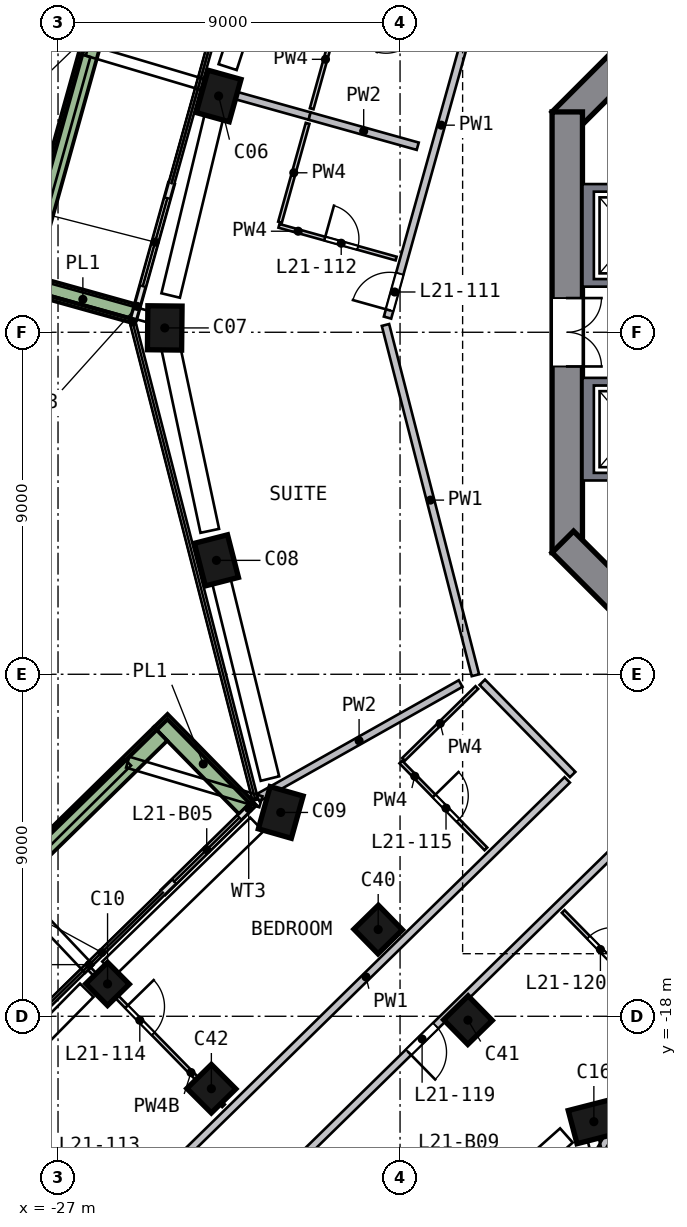
"""IFC4 building model, lengths in metres.
Left out: names, types, materials, properties, quantities, classifications, styles, units other than length and angle.
Written with IfcOpenShell. Run it as: python <this file> out.ifc"""

import sys

from ifc_helpers import new_model, si_unit, direction, frame, frame_2d, origin, origin_2d, place, context, subcontext, project, spatial, polyline, rectangle, outline, extrude, element, fill, save


model = new_model("IFC4")
c1 = context("Model", 3, precision=1e-05, world=origin(), true_north=direction((0.0, 1.0)))
c2 = subcontext(c1, "Body", "Model", "MODEL_VIEW")
j1 = project(units=[si_unit("LENGTHUNIT", "METRE"), si_unit("PLANEANGLEUNIT", "RADIAN")], contexts=[c1])
p1 = place(None, origin())
s1 = spatial("IfcSite", under=j1, at=p1, CompositionType="ELEMENT")
p2 = place(p1, origin())
s2 = spatial("IfcBuilding", under=s1, at=p2, CompositionType="ELEMENT")
p3 = place(p2, frame((0.0, 0.0, 93.0)))
s3 = spatial("IfcBuildingStorey", under=s2, at=p3, CompositionType="ELEMENT", Elevation=93.0)
p4 = place(p3, frame((-22.739, 6.349, 0.0), z_axis=(-0.029279539, -0.108372319, 0.993679098), x_axis=(-0.267305592, -0.957051078, -0.112253975)))
e1 = element("IfcColumn", 1, at=p4, inside=s3, PredefinedType="COLUMN", context=c2, shape_type="SweptSolid", body=[
    extrude(rectangle(XDim=1.15, YDim=0.9, at=origin_2d()), origin(), (0.0, 0.0, 1.0), 3.21),
])
p5 = place(p3, frame((-24.191, 0.253, 0.0), z_axis=(-0.000228077, -0.11510311, 0.993353523), x_axis=(0.010401576, 0.993299538, 0.115099243)))
e2 = element("IfcColumn", 2, at=p5, inside=s3, PredefinedType="COLUMN", context=c2, shape_type="SweptSolid", body=[
    extrude(rectangle(XDim=1.15, YDim=0.9, at=origin_2d()), origin(), (0.0, 0.0, 1.0), 3.211),
])
p6 = place(p3, frame((-22.867, -5.871, 0.0), z_axis=(0.028823141, -0.108524069, 0.993675879), x_axis=(0.246911463, -0.962510976, -0.112282459)))
e3 = element("IfcColumn", 3, at=p6, inside=s3, PredefinedType="COLUMN", context=c2, shape_type="SweptSolid", body=[
    extrude(rectangle(XDim=1.15, YDim=0.9, at=origin_2d()), origin(), (0.0, 0.0, 1.0), 3.21),
])
p7 = place(p3, frame((-21.212, -12.515, 0.0), z_axis=(0.060350449, -0.100330722, 0.993122132), x_axis=(0.274530896, 0.958234332, 0.080123357)))
e4 = element("IfcColumn", 4, at=p7, inside=s3, PredefinedType="COLUMN", context=c2, shape_type="SweptSolid", body=[
    extrude(rectangle(XDim=1.15, YDim=0.9, at=origin_2d()), origin(), (0.0, 0.0, 1.0), 3.212),
])
p8 = place(p3, frame((-25.863, -17.069, 0.0), z_axis=(0.13669492, -0.066040213, 0.988409424), x_axis=(-0.708286762, -0.704086575, 0.050911266)))
e5 = element("IfcColumn", 5, at=p8, inside=s3, PredefinedType="COLUMN", context=c2, shape_type="SweptSolid", body=[
    extrude(rectangle(XDim=0.8, YDim=0.8, at=origin_2d()), origin(), (0.0, 0.0, 1.0), 3.227),
])
p9 = place(p3, frame((-13.02, -20.7, 0.0), z_axis=(0.098896689, -0.061040769, 0.993223776), x_axis=(-0.963723758, -0.254530475, 0.080316596)))
e6 = element("IfcColumn", 6, at=p9, inside=s3, PredefinedType="COLUMN", context=c2, shape_type="SweptSolid", body=[
    extrude(rectangle(XDim=1.15, YDim=0.9, at=origin_2d()), origin(), (0.0, 0.0, 1.0), 3.212),
])
for number, where, z_axis, x_axis in (
    (7, (-18.666, -15.611, 0.0), (0.075, -0.088, 0.993), (-0.715, -0.699, -0.008)),
    (8, (-16.317, -18.009, 0.0), (0.086, -0.077, 0.993), (-0.714, -0.7, 0.008)),
):
    element("IfcColumn", number, at=place(p3, frame(where, z_axis=z_axis, x_axis=x_axis)), inside=s3, PredefinedType="COLUMN", context=c2, shape_type="SweptSolid", body=[
        extrude(rectangle(XDim=0.9, YDim=0.9, at=origin_2d()), origin(), (0.0, 0.0, 1.0), 3.211),
    ])
p10 = place(p3, frame((-23.147, -19.842, 0.0), z_axis=(0.149542975, -0.053046573, 0.987331231), x_axis=(-0.705762773, -0.705078684, 0.069014181)))
e9 = element("IfcColumn", 9, at=p10, inside=s3, PredefinedType="COLUMN", context=c2, shape_type="SweptSolid", body=[
    extrude(rectangle(XDim=0.9, YDim=0.9, at=origin_2d()), origin(), (0.0, 0.0, 1.0), 3.231),
])
p11 = place(p3, frame((-5.516, 13.717, 0.0), z_axis=(0.0, 0.0, 1.0), x_axis=(-0.707106781, -0.707106781, 0.0)))
e10 = element("IfcWall", 10, at=p11, inside=s3, PredefinedType="SHEAR", context=c2, shape_type="SweptSolid", body=[
    extrude(rectangle(XDim=11.598, YDim=0.8, at=frame_2d((5.799, 0.0))), origin(), (0.0, 0.0, 1.0), 3.5),
])
p12 = place(p3, frame((-13.6, 5.799, 0.0), z_axis=(0.0, 0.0, 1.0), x_axis=(0.0, -1.0, 0.0)))
e11 = element("IfcWall", 11, at=p12, inside=s3, PredefinedType="SHEAR", context=c2, shape_type="SweptSolid", body=[
    extrude(rectangle(XDim=11.598, YDim=0.8, at=frame_2d((5.799, 0.0))), origin(), (0.0, 0.0, 1.0), 3.5),
])
p13 = place(p12, frame((4.899, 0.0, 0.0)))
e12 = element("IfcOpeningElement", 12, at=p13, cuts=e11, PredefinedType="OPENING", context=c2, shape_type="SweptSolid", body=[
    extrude(rectangle(XDim=1.8, YDim=2.1, at=frame_2d((0.9, 1.05))), frame((0.0, 0.41, 0.0), z_axis=(0.0, -1.0, 0.0), x_axis=(1.0, 0.0, 0.0)), (0.0, 0.0, 1.0), 0.82),
])
p14 = place(p3, frame((-13.717, -5.516, 0.0), z_axis=(0.0, 0.0, 1.0), x_axis=(0.707106781, -0.707106781, 0.0)))
e13 = element("IfcWall", 13, at=p14, inside=s3, PredefinedType="SHEAR", context=c2, shape_type="SweptSolid", body=[
    extrude(rectangle(XDim=11.598, YDim=0.8, at=frame_2d((5.799, 0.0))), origin(), (0.0, 0.0, 1.0), 3.5),
])
p15 = place(p14, frame((2.099, 0.0, 0.0)))
e14 = element("IfcOpeningElement", 14, at=p15, cuts=e13, PredefinedType="OPENING", context=c2, shape_type="SweptSolid", body=[
    extrude(rectangle(XDim=1.2, YDim=2.1, at=frame_2d((0.6, 1.05))), frame((0.0, 0.41, 0.0), z_axis=(0.0, -1.0, 0.0), x_axis=(1.0, 0.0, 0.0)), (0.0, 0.0, 1.0), 0.82),
])
p16 = place(p3, frame((-24.016, 3.913, 0.0), z_axis=(0.0, 0.0, 1.0), x_axis=(-0.268875634, -0.963174903, 0.0)))
e15 = element("IfcWall", 15, at=p16, inside=s3, PredefinedType="SOLIDWALL", context=c2, shape_type="SweptSolid", body=[
    extrude(rectangle(XDim=3.71, YDim=0.15, at=frame_2d((1.855, 0.0))), origin(), (0.0, 0.0, 1.0), 2.425),
])
p17 = place(p16, frame((0.4, 0.0, 0.0)))
e16 = element("IfcOpeningElement", 16, at=p17, cuts=e15, PredefinedType="OPENING", context=c2, shape_type="SweptSolid", body=[
    extrude(rectangle(XDim=2.4, YDim=2.4, at=frame_2d((1.2, 1.2))), frame((0.0, 0.085, 0.0), z_axis=(0.0, -1.0, 0.0), x_axis=(1.0, 0.0, 0.0)), (0.0, 0.0, 1.0), 0.17),
])
p18 = place(p3, frame((-21.877, -12.431, 0.0), z_axis=(0.0, 0.0, 1.0), x_axis=(-0.71448032, -0.699655539, 0.0)))
e17 = element("IfcWall", 17, at=p18, inside=s3, PredefinedType="SOLIDWALL", context=c2, shape_type="SweptSolid", body=[
    extrude(rectangle(XDim=3.294, YDim=0.15, at=frame_2d((1.647, 0.0))), origin(), (0.0, 0.0, 1.0), 2.425),
])
p19 = place(p18, frame((0.494, 0.0, 0.0)))
e18 = element("IfcOpeningElement", 18, at=p19, cuts=e17, PredefinedType="OPENING", context=c2, shape_type="SweptSolid", body=[
    extrude(rectangle(XDim=2.4, YDim=2.4, at=frame_2d((1.2, 1.2))), frame((0.0, 0.085, 0.0), z_axis=(0.0, -1.0, 0.0), x_axis=(1.0, 0.0, 0.0)), (0.0, 0.0, 1.0), 0.17),
])
p20 = place(p3, frame((-24.263, 14.274, 0.0), z_axis=(0.0, 0.0, 1.0), x_axis=(-0.26893369, -0.963158694, 0.0)))
e19 = element("IfcWall", 19, at=p20, inside=s3, PredefinedType="SOLIDWALL", context=c2, shape_type="SweptSolid", body=[
    extrude(rectangle(XDim=13.723, YDim=0.5, at=frame_2d((6.862, 0.0))), origin(), (0.0, 0.0, 1.0), 0.7),
])
p21 = place(p3, frame((-27.646, 1.23, 0.0), z_axis=(0.0, 0.0, 1.0), x_axis=(0.963161982, -0.268921917, 0.0)))
e20 = element("IfcWall", 20, at=p21, inside=s3, PredefinedType="SOLIDWALL", context=c2, shape_type="SweptSolid", body=[
    extrude(rectangle(XDim=2.699, YDim=0.5, at=frame_2d((1.35, 0.0))), origin(), (0.0, 0.0, 1.0), 0.7),
])
p22 = place(p3, frame((-22.059, -12.503, 0.0), z_axis=(0.0, 0.0, 1.0), x_axis=(-0.699703527, 0.714433324, 0.0)))
e21 = element("IfcWall", 21, at=p22, inside=s3, PredefinedType="SOLIDWALL", context=c2, shape_type="SweptSolid", body=[
    extrude(rectangle(XDim=3.199, YDim=0.5, at=frame_2d((1.6, 0.0))), origin(), (0.0, 0.0, 1.0), 0.7),
])
p23 = place(p3, frame((-24.301, -10.571, 0.0), z_axis=(0.0, 0.0, 1.0), x_axis=(-0.714470428, -0.69966564, 0.0)))
e22 = element("IfcWall", 22, at=p23, inside=s3, PredefinedType="SOLIDWALL", context=c2, shape_type="SweptSolid", body=[
    extrude(rectangle(XDim=11.824, YDim=0.5, at=frame_2d((5.912, 0.0))), origin(), (0.0, 0.0, 1.0), 0.7),
])
p24 = place(p3, origin())
e23 = element("IfcWall", 23, at=p24, inside=s3, PredefinedType="SOLIDWALL", context=c2, shape_type="SweptSolid", body=[
    extrude(outline(polyline([(-13.2, 3.9), (-10.9, 3.9), (-10.9, 3.7), (-12.9, 3.7), (-12.9, 1.4), (-10.9, 1.4), (-10.9, 1.2), (-13.2, 1.2), (-13.2, 3.9)])), origin(), (0.0, 0.0, 1.0), 3.19),
])
p25 = place(p3, origin())
e24 = element("IfcWall", 24, at=p25, inside=s3, PredefinedType="SOLIDWALL", context=c2, shape_type="SweptSolid", body=[
    extrude(outline(polyline([(-13.2, -3.9), (-13.2, -1.2), (-10.9, -1.2), (-10.9, -1.4), (-12.9, -1.4), (-12.9, -3.7), (-10.9, -3.7), (-10.9, -3.9), (-13.2, -3.9)])), origin(), (0.0, 0.0, 1.0), 3.19),
])
p26 = place(p3, frame((-26.907, -24.809, 0.0), z_axis=(0.0, 0.0, 1.0), x_axis=(0.714474521, 0.699661461, 0.0)))
e25 = element("IfcWall", 25, at=p26, inside=s3, PredefinedType="SOLIDWALL", context=c2, shape_type="SweptSolid", body=[
    extrude(rectangle(XDim=18.624, YDim=0.2, at=frame_2d((9.312, 0.0))), origin(), (0.0, 0.0, 1.0), 3.19),
])
p27 = place(p26, frame((2.6, 0.0, 0.0)))
e26 = element("IfcOpeningElement", 26, at=p27, cuts=e25, PredefinedType="OPENING", context=c2, shape_type="SweptSolid", body=[
    extrude(rectangle(XDim=1.0, YDim=2.1, at=frame_2d((0.5, 1.05))), frame((0.0, 0.11, 0.0), z_axis=(0.0, -1.0, 0.0), x_axis=(1.0, 0.0, 0.0)), (0.0, 0.0, 1.0), 0.22),
])
p28 = place(p3, frame((-12.061, -13.351, 0.0), z_axis=(0.0, 0.0, 1.0), x_axis=(-0.714474521, -0.699661461, 0.0)))
e27 = element("IfcWall", 27, at=p28, inside=s3, PredefinedType="SOLIDWALL", context=c2, shape_type="SweptSolid", body=[
    extrude(rectangle(XDim=18.624, YDim=0.2, at=frame_2d((9.312, 0.0))), origin(), (0.0, 0.0, 1.0), 3.19),
])
p29 = place(p28, frame((7.0, 0.0, 0.0)))
e28 = element("IfcOpeningElement", 28, at=p29, cuts=e27, PredefinedType="OPENING", context=c2, shape_type="SweptSolid", body=[
    extrude(rectangle(XDim=1.0, YDim=2.1, at=frame_2d((0.5, 1.05))), frame((0.0, 0.11, 0.0), z_axis=(0.0, -1.0, 0.0), x_axis=(1.0, 0.0, 0.0)), (0.0, 0.0, 1.0), 0.22),
])
p30 = place(p3, frame((-18.384, 0.192, 0.0), z_axis=(0.0, 0.0, 1.0), x_axis=(0.248682116, -0.968585156, 0.0)))
e29 = element("IfcWall", 29, at=p30, inside=s3, PredefinedType="SOLIDWALL", context=c2, shape_type="SweptSolid", body=[
    extrude(rectangle(XDim=9.516, YDim=0.2, at=frame_2d((4.758, 0.0))), origin(), (0.0, 0.0, 1.0), 3.19),
])
p31 = place(p3, frame((-18.33, 0.386, 0.0), z_axis=(0.0, 0.0, 1.0), x_axis=(0.268911641, 0.96316485, 0.0)))
e30 = element("IfcWall", 30, at=p31, inside=s3, PredefinedType="SOLIDWALL", context=c2, shape_type="SweptSolid", body=[
    extrude(rectangle(XDim=9.116, YDim=0.2, at=frame_2d((4.558, 0.0))), origin(), (0.0, 0.0, 1.0), 3.19),
])
p32 = place(p31, frame((0.2, 0.0, 0.0)))
e31 = element("IfcOpeningElement", 31, at=p32, cuts=e30, PredefinedType="OPENING", context=c2, shape_type="SweptSolid", body=[
    extrude(rectangle(XDim=1.0, YDim=2.1, at=frame_2d((0.5, 1.05))), frame((0.0, 0.11, 0.0), z_axis=(0.0, -1.0, 0.0), x_axis=(1.0, 0.0, 0.0)), (0.0, 0.0, 1.0), 0.22),
])
p33 = place(p3, frame((-15.836, -9.21, 0.0), z_axis=(0.0, 0.0, 1.0), x_axis=(0.699635485, -0.714499957, 0.0)))
e32 = element("IfcWall", 32, at=p33, inside=s3, PredefinedType="SOLIDWALL", context=c2, shape_type="SweptSolid", body=[
    extrude(rectangle(XDim=3.4, YDim=0.2, at=frame_2d((1.7, 0.0))), origin(), (0.0, 0.0, 1.0), 3.19),
])
p34 = place(p3, frame((-20.379, 5.69, 0.0), z_axis=(0.0, 0.0, 1.0), x_axis=(-0.963170883, 0.268890033, 0.0)))
e33 = element("IfcWall", 33, at=p34, inside=s3, PredefinedType="SOLIDWALL", context=c2, shape_type="SweptSolid", body=[
    extrude(rectangle(XDim=2.95, YDim=0.2, at=frame_2d((1.475, 0.0))), origin(), (0.0, 0.0, 1.0), 3.19),
])
p35 = place(p3, frame((-16.407, -9.245, 0.0), z_axis=(0.0, 0.0, 1.0), x_axis=(-0.871211654, -0.490907581, 0.0)))
e34 = element("IfcWall", 34, at=p35, inside=s3, PredefinedType="SOLIDWALL", context=c2, shape_type="SweptSolid", body=[
    extrude(rectangle(XDim=6.132, YDim=0.2, at=frame_2d((3.066, 0.0))), origin(), (0.0, 0.0, 1.0), 3.19),
])
p36 = place(p3, frame((-17.535, 4.896, 0.0), z_axis=(0.0, 0.0, 1.0), x_axis=(-0.963150985, 0.268961298, 0.0)))
e35 = element("IfcWall", 35, at=p36, inside=s3, PredefinedType="SOLIDWALL", context=c2, shape_type="SweptSolid", body=[
    extrude(rectangle(XDim=2.953, YDim=0.2, at=frame_2d((1.477, 0.0))), origin(), (0.0, 0.0, 1.0), 3.19),
])
p37 = place(p3, frame((-11.175, -18.896, 0.0), z_axis=(0.0, 0.0, 1.0), x_axis=(-0.509048846, -0.860737633, 0.0)))
e36 = element("IfcWall", 36, at=p37, inside=s3, PredefinedType="SOLIDWALL", context=c2, shape_type="SweptSolid", body=[
    extrude(rectangle(XDim=3.011, YDim=0.2, at=frame_2d((1.506, 0.0))), origin(), (0.0, 0.0, 1.0), 2.69),
])
p38 = place(p3, frame((-26.177, -16.747, 0.0), z_axis=(0.0, 0.0, 1.0), x_axis=(0.699671581, -0.71446461, 0.0)))
e37 = element("IfcWall", 37, at=p38, inside=s3, PredefinedType="PARTITIONING", context=c2, shape_type="SweptSolid", body=[
    extrude(rectangle(XDim=5.05, YDim=0.1, at=frame_2d((2.525, 0.0))), origin(), (0.0, 0.0, 1.0), 2.69),
])
p39 = place(p38, frame((1.4, 0.0, 0.0)))
e38 = element("IfcOpeningElement", 38, at=p39, cuts=e37, PredefinedType="OPENING", context=c2, shape_type="SweptSolid", body=[
    extrude(rectangle(XDim=1.0, YDim=2.1, at=frame_2d((0.5, 1.05))), frame((0.0, 0.06, 0.0), z_axis=(0.0, -1.0, 0.0), x_axis=(1.0, 0.0, 0.0)), (0.0, 0.0, 1.0), 0.12),
])
for number, where, z_axis, x_axis in (
    (39, (-21.159, 2.897, 0.0), (0.0, 0.0, 1.0), (0.269, 0.963, 0.0)),
    (40, (-19.599, 8.483, 0.0), (0.0, 0.0, 1.0), (-0.269, -0.963, 0.0)),
):
    element("IfcWall", number, at=place(p3, frame(where, z_axis=z_axis, x_axis=x_axis)), inside=s3, PredefinedType="PARTITIONING", context=c2, shape_type="SweptSolid", body=[
        extrude(rectangle(XDim=2.7, YDim=0.1, at=frame_2d((1.35, 0.0))), origin(), (0.0, 0.0, 1.0), 3.19),
    ])
p40 = place(p3, frame((-21.186, 2.8, 0.0), z_axis=(0.0, 0.0, 1.0), x_axis=(0.9631816, -0.26885164, 0.0)))
e41 = element("IfcWall", 41, at=p40, inside=s3, PredefinedType="PARTITIONING", context=c2, shape_type="SweptSolid", body=[
    extrude(rectangle(XDim=3.2, YDim=0.1, at=frame_2d((1.6, 0.0))), origin(), (0.0, 0.0, 1.0), 3.19),
])
p41 = place(p40, frame((1.25, 0.0, 0.0)))
e42 = element("IfcOpeningElement", 42, at=p41, cuts=e41, PredefinedType="OPENING", context=c2, shape_type="SweptSolid", body=[
    extrude(rectangle(XDim=0.9, YDim=2.1, at=frame_2d((0.45, 1.05))), frame((0.0, 0.06, 0.0), z_axis=(0.0, -1.0, 0.0), x_axis=(1.0, 0.0, 0.0)), (0.0, 0.0, 1.0), 0.12),
])
p42 = place(p3, frame((-15.979, -9.35, 0.0), z_axis=(0.0, 0.0, 1.0), x_axis=(-0.714437911, -0.699698843, 0.0)))
e43 = element("IfcWall", 43, at=p42, inside=s3, PredefinedType="PARTITIONING", context=c2, shape_type="SweptSolid", body=[
    extrude(rectangle(XDim=2.7, YDim=0.1, at=frame_2d((1.35, 0.0))), origin(), (0.0, 0.0, 1.0), 3.19),
])
p43 = place(p3, frame((-17.98, -11.309, 0.0), z_axis=(0.0, 0.0, 1.0), x_axis=(0.699667797, -0.714468315, 0.0)))
e44 = element("IfcWall", 44, at=p43, inside=s3, PredefinedType="PARTITIONING", context=c2, shape_type="SweptSolid", body=[
    extrude(rectangle(XDim=3.2, YDim=0.1, at=frame_2d((1.6, 0.0))), origin(), (0.0, 0.0, 1.0), 3.19),
])
p44 = place(p43, frame((1.25, 0.0, 0.0)))
e45 = element("IfcOpeningElement", 45, at=p44, cuts=e44, PredefinedType="OPENING", context=c2, shape_type="SweptSolid", body=[
    extrude(rectangle(XDim=0.9, YDim=2.1, at=frame_2d((0.45, 1.05))), frame((0.0, 0.06, 0.0), z_axis=(0.0, -1.0, 0.0), x_axis=(1.0, 0.0, 0.0)), (0.0, 0.0, 1.0), 0.12),
])
p45 = place(p3, frame((-13.708, -15.243, 0.0), z_axis=(0.0, 0.0, 1.0), x_axis=(0.699703553, -0.714433298, 0.0)))
e46 = element("IfcWall", 46, at=p45, inside=s3, PredefinedType="PARTITIONING", context=c2, shape_type="SweptSolid", body=[
    extrude(rectangle(XDim=3.0, YDim=0.1, at=frame_2d((1.5, 0.0))), origin(), (0.0, 0.0, 1.0), 3.19),
])
p46 = place(p45, frame((0.95, 0.0, 0.0)))
e47 = element("IfcOpeningElement", 47, at=p46, cuts=e46, PredefinedType="OPENING", context=c2, shape_type="SweptSolid", body=[
    extrude(rectangle(XDim=0.9, YDim=2.1, at=frame_2d((0.45, 1.05))), frame((0.0, 0.06, 0.0), z_axis=(0.0, -1.0, 0.0), x_axis=(1.0, 0.0, 0.0)), (0.0, 0.0, 1.0), 0.12),
])
p47 = place(p17, origin())
e48 = element("IfcDoor", 48, at=p47, inside=s3, OperationType="SLIDING_TO_RIGHT", PredefinedType="DOOR", context=c2, shape_type="SweptSolid", body=[
    extrude(rectangle(XDim=2.4, YDim=2.4, at=frame_2d((1.2, 1.2))), frame((0.0, 0.025, 0.0), z_axis=(0.0, -1.0, 0.0), x_axis=(1.0, 0.0, 0.0)), (0.0, 0.0, 1.0), 0.05),
])
fill(e16, e48)
p48 = place(p19, origin())
e49 = element("IfcDoor", 49, at=p48, inside=s3, OperationType="SLIDING_TO_LEFT", PredefinedType="DOOR", context=c2, shape_type="SweptSolid", body=[
    extrude(rectangle(XDim=2.4, YDim=2.4, at=frame_2d((1.2, 1.2))), frame((0.0, 0.025, 0.0), z_axis=(0.0, -1.0, 0.0), x_axis=(1.0, 0.0, 0.0)), (0.0, 0.0, 1.0), 0.05),
])
fill(e18, e49)
p49 = place(p13, origin())
e50 = element("IfcDoor", 50, at=p49, inside=s3, OperationType="DOUBLE_DOOR_SINGLE_SWING", PredefinedType="DOOR", context=c2, shape_type="SweptSolid", body=[
    extrude(rectangle(XDim=1.8, YDim=2.1, at=frame_2d((0.9, 1.05))), frame((0.0, 0.025, 0.0), z_axis=(0.0, -1.0, 0.0), x_axis=(1.0, 0.0, 0.0)), (0.0, 0.0, 1.0), 0.05),
])
fill(e12, e50)
p50 = place(p32, origin())
e51 = element("IfcDoor", 51, at=p50, inside=s3, OperationType="SINGLE_SWING_LEFT", PredefinedType="DOOR", context=c2, shape_type="SweptSolid", body=[
    extrude(rectangle(XDim=1.0, YDim=2.1, at=frame_2d((0.5, 1.05))), frame((0.0, 0.025, 0.0), z_axis=(0.0, -1.0, 0.0), x_axis=(1.0, 0.0, 0.0)), (0.0, 0.0, 1.0), 0.05),
])
fill(e31, e51)
p51 = place(p41, origin())
e52 = element("IfcDoor", 52, at=p51, inside=s3, OperationType="SINGLE_SWING_LEFT", PredefinedType="DOOR", context=c2, shape_type="SweptSolid", body=[
    extrude(rectangle(XDim=0.9, YDim=2.1, at=frame_2d((0.45, 1.05))), frame((0.0, 0.025, 0.0), z_axis=(0.0, -1.0, 0.0), x_axis=(1.0, 0.0, 0.0)), (0.0, 0.0, 1.0), 0.05),
])
fill(e42, e52)
p52 = place(p39, origin())
e53 = element("IfcDoor", 53, at=p52, inside=s3, OperationType="SINGLE_SWING_LEFT", PredefinedType="DOOR", context=c2, shape_type="SweptSolid", body=[
    extrude(rectangle(XDim=1.0, YDim=2.1, at=frame_2d((0.5, 1.05))), frame((0.0, 0.025, 0.0), z_axis=(0.0, -1.0, 0.0), x_axis=(1.0, 0.0, 0.0)), (0.0, 0.0, 1.0), 0.05),
])
fill(e38, e53)
p53 = place(p44, origin())
e54 = element("IfcDoor", 54, at=p53, inside=s3, OperationType="SINGLE_SWING_LEFT", PredefinedType="DOOR", context=c2, shape_type="SweptSolid", body=[
    extrude(rectangle(XDim=0.9, YDim=2.1, at=frame_2d((0.45, 1.05))), frame((0.0, 0.025, 0.0), z_axis=(0.0, -1.0, 0.0), x_axis=(1.0, 0.0, 0.0)), (0.0, 0.0, 1.0), 0.05),
])
fill(e45, e54)
p54 = place(p29, origin())
e55 = element("IfcDoor", 55, at=p54, inside=s3, OperationType="SINGLE_SWING_RIGHT", PredefinedType="DOOR", context=c2, shape_type="SweptSolid", body=[
    extrude(rectangle(XDim=1.0, YDim=2.1, at=frame_2d((0.5, 1.05))), frame((0.0, 0.025, 0.0), z_axis=(0.0, -1.0, 0.0), x_axis=(1.0, 0.0, 0.0)), (0.0, 0.0, 1.0), 0.05),
])
fill(e28, e55)
p55 = place(p46, origin())
e56 = element("IfcDoor", 56, at=p55, inside=s3, OperationType="SINGLE_SWING_RIGHT", PredefinedType="DOOR", context=c2, shape_type="SweptSolid", body=[
    extrude(rectangle(XDim=0.9, YDim=2.1, at=frame_2d((0.45, 1.05))), frame((0.0, 0.025, 0.0), z_axis=(0.0, -1.0, 0.0), x_axis=(1.0, 0.0, 0.0)), (0.0, 0.0, 1.0), 0.05),
])
fill(e47, e56)
save(model, sys.argv[1])
